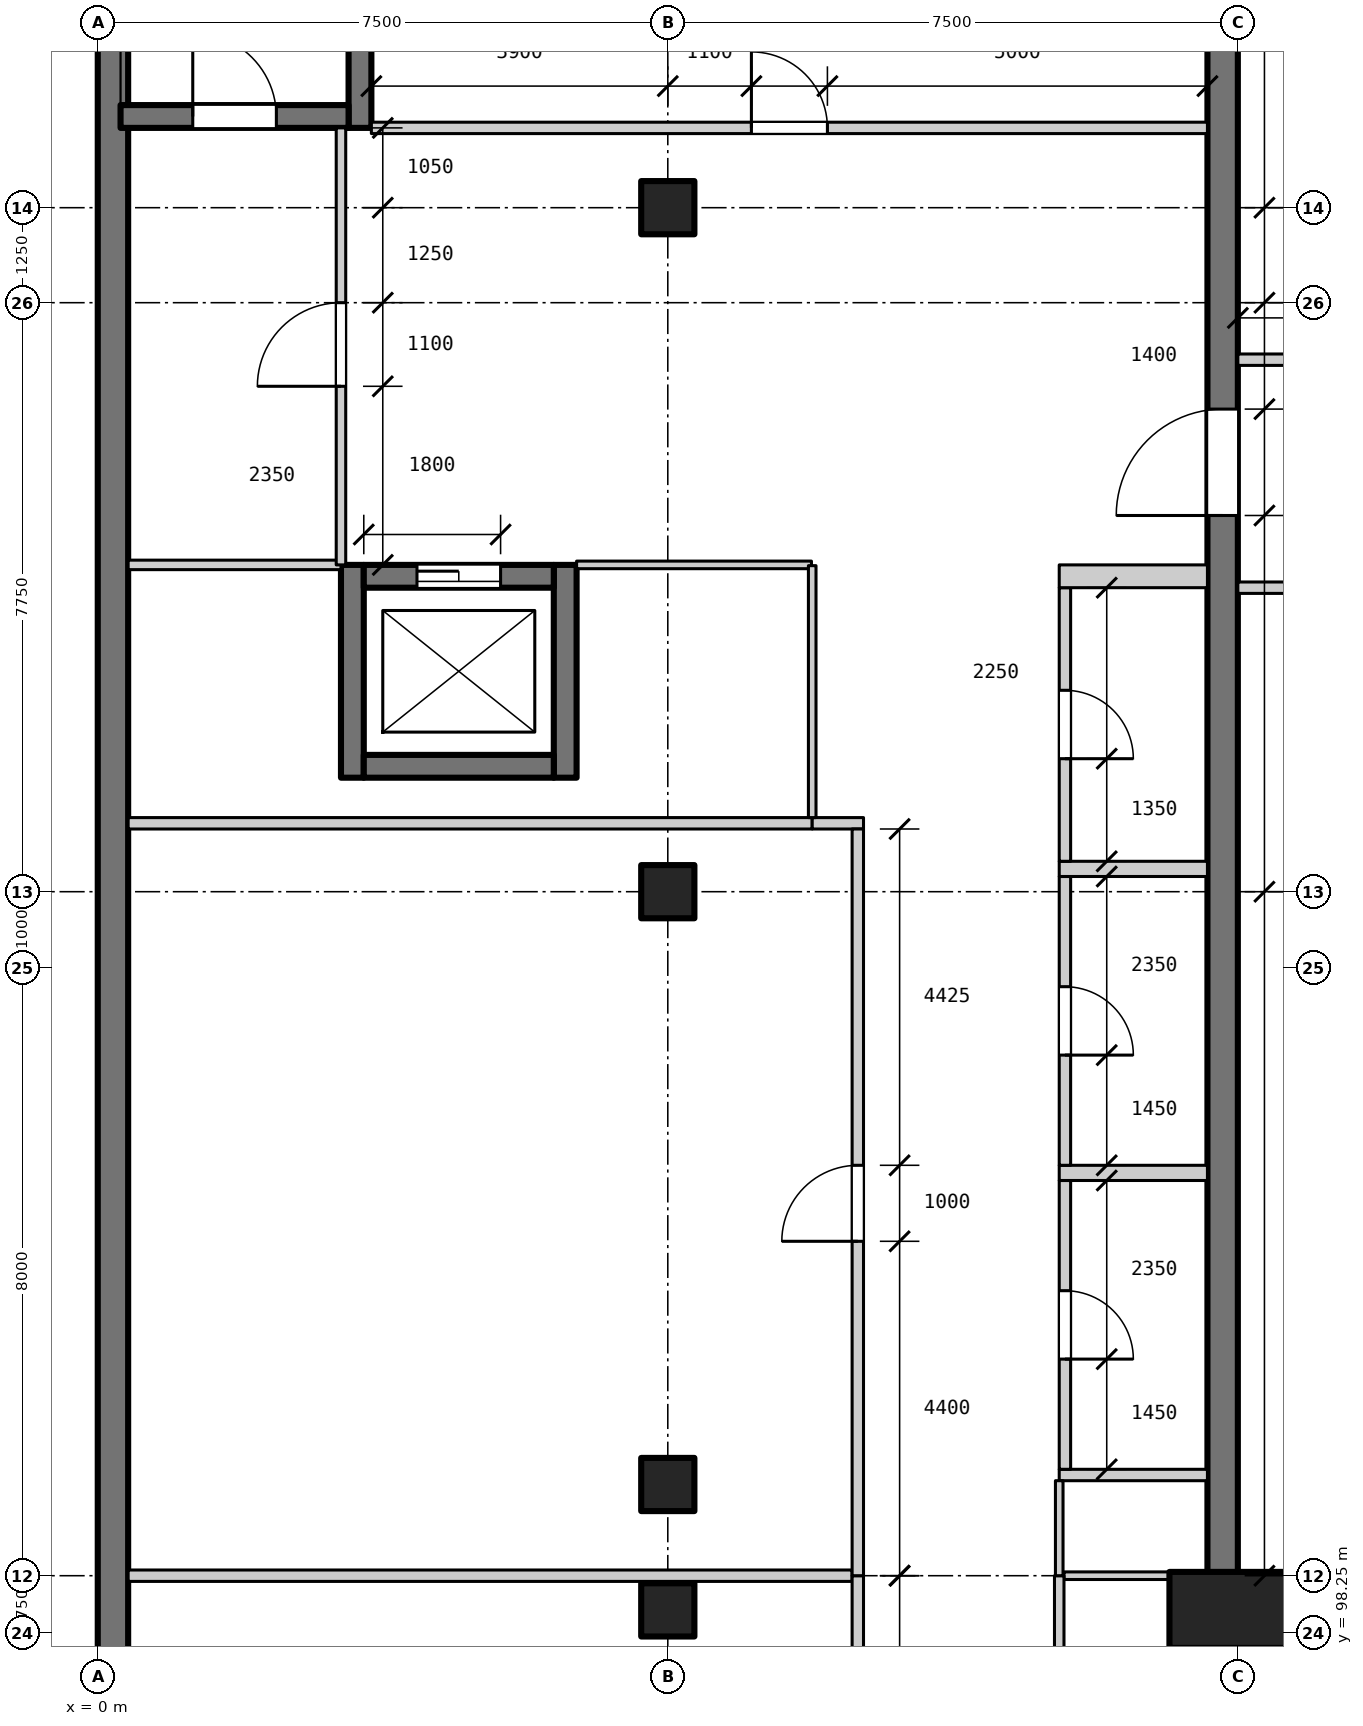
"""IFC4 building model, lengths in metres.
Left out: names, types, materials, properties, quantities, classifications, styles, units other than length and angle.
Written with IfcOpenShell. Run it as: python <this file> out.ifc"""

import sys

from ifc_helpers import new_model, si_unit, direction, frame, frame_2d, origin, origin_2d, place, context, subcontext, project, spatial, rectangle, extrude, element, fill, save


model = new_model("IFC4")
c1 = context("Model", 3, precision=1e-05, world=origin(), true_north=direction((0.0, 1.0)))
c2 = subcontext(c1, "Body", "Model", "MODEL_VIEW")
j1 = project(units=[si_unit("LENGTHUNIT", "METRE"), si_unit("PLANEANGLEUNIT", "RADIAN")], contexts=[c1])
p1 = place(None, origin())
s1 = spatial("IfcSite", under=j1, at=p1, CompositionType="ELEMENT")
p2 = place(p1, origin())
s2 = spatial("IfcBuilding", under=s1, at=p2, CompositionType="ELEMENT")
p3 = place(p2, frame((0.0, 0.0, -10.0)))
s3 = spatial("IfcBuildingStorey", under=s2, at=p3, CompositionType="ELEMENT", Elevation=-10.0)
for number, where, z_axis, x_axis in (
    (1, (7.5, 98.55, -1.4), (0.0, 0.0, 1.0), (1.0, 0.0, 0.0)),
    (2, (7.5, 100.2, -1.4), (0.0, 0.0, 1.0), (1.0, 0.0, 0.0)),
    (3, (7.5, 108.0, -1.4), (0.0, 0.0, 1.0), (1.0, 0.0, 0.0)),
    (4, (7.5, 117.0, -1.4), (0.0, 0.0, 1.0), (1.0, 0.0, 0.0)),
):
    element("IfcColumn", number, at=place(p3, frame(where, z_axis=z_axis, x_axis=x_axis)), inside=s3, PredefinedType="COLUMN", context=c2, shape_type="SweptSolid", body=[
        extrude(rectangle(XDim=0.7, YDim=0.7, at=origin_2d()), origin(), (0.0, 0.0, 1.0), 6.4),
    ])
p4 = place(p3, frame((0.2, 18.0, -1.4), z_axis=(0.0, 0.0, 1.0), x_axis=(0.0, 1.0, 0.0)))
e5 = element("IfcWall", 5, at=p4, inside=s3, PredefinedType="SOLIDWALL", context=c2, shape_type="SweptSolid", body=[
    extrude(rectangle(XDim=108.0, YDim=0.4, at=frame_2d((54.0, 0.0))), origin(), (0.0, 0.0, 1.0), 6.4),
])
p5 = place(p3, frame((14.8, 99.0, -1.4), z_axis=(0.0, 0.0, 1.0), x_axis=(0.0, 1.0, 0.0)))
e6 = element("IfcWall", 6, at=p5, inside=s3, PredefinedType="SHEAR", context=c2, shape_type="SweptSolid", body=[
    extrude(rectangle(XDim=26.6, YDim=0.4, at=frame_2d((13.3, 0.0))), origin(), (0.0, 0.0, 1.0), 6.4),
])
p6 = place(p5, frame((13.95, 0.0, 1.4)))
e7 = element("IfcOpeningElement", 7, at=p6, cuts=e6, PredefinedType="OPENING", context=c2, shape_type="SweptSolid", body=[
    extrude(rectangle(XDim=1.4, YDim=2.4, at=frame_2d((0.7, 1.2))), frame((0.0, 0.21, 0.0), z_axis=(0.0, -1.0, 0.0), x_axis=(1.0, 0.0, 0.0)), (0.0, 0.0, 1.0), 0.42),
])
p7 = place(p3, frame((3.45, 118.05, 0.0), z_axis=(0.0, 0.0, 1.0), x_axis=(0.0, 1.0, 0.0)))
e8 = element("IfcWall", 8, at=p7, inside=s3, PredefinedType="SHEAR", context=c2, shape_type="SweptSolid", body=[
    extrude(rectangle(XDim=7.5, YDim=0.3, at=frame_2d((3.75, 0.0))), origin(), (0.0, 0.0, 1.0), 5.0),
])
p8 = place(p3, frame((0.3, 118.2, 0.0), z_axis=(0.0, 0.0, 1.0), x_axis=(1.0, 0.0, 0.0)))
e9 = element("IfcWall", 9, at=p8, inside=s3, PredefinedType="SHEAR", context=c2, shape_type="SweptSolid", body=[
    extrude(rectangle(XDim=3.0, YDim=0.3, at=frame_2d((1.5, 0.0))), origin(), (0.0, 0.0, 1.0), 5.0),
])
p9 = place(p8, frame((0.95, 0.0, 0.0)))
e10 = element("IfcOpeningElement", 10, at=p9, cuts=e9, PredefinedType="OPENING", context=c2, shape_type="SweptSolid", body=[
    extrude(rectangle(XDim=1.1, YDim=2.1, at=frame_2d((0.55, 1.05))), frame((0.0, 0.16, 0.0), z_axis=(0.0, -1.0, 0.0), x_axis=(1.0, 0.0, 0.0)), (0.0, 0.0, 1.0), 0.32),
])
for number, where, z_axis, x_axis in (
    (11, (3.35, 109.5, -1.4), (0.0, 0.0, 1.0), (0.0, 1.0, 0.0)),
    (12, (6.15, 109.5, -1.4), (0.0, 0.0, 1.0), (0.0, 1.0, 0.0)),
):
    element("IfcWall", number, at=place(p3, frame(where, z_axis=z_axis, x_axis=x_axis)), inside=s3, PredefinedType="SHEAR", context=c2, shape_type="SweptSolid", body=[
        extrude(rectangle(XDim=2.8, YDim=0.3, at=frame_2d((1.4, 0.0))), origin(), (0.0, 0.0, 1.0), 6.4),
    ])
p10 = place(p3, frame((3.5, 109.65, -1.4), z_axis=(0.0, 0.0, 1.0), x_axis=(1.0, 0.0, 0.0)))
e13 = element("IfcWall", 13, at=p10, inside=s3, PredefinedType="SHEAR", context=c2, shape_type="SweptSolid", body=[
    extrude(rectangle(XDim=2.5, YDim=0.3, at=frame_2d((1.25, 0.0))), origin(), (0.0, 0.0, 1.0), 6.4),
])
p11 = place(p3, frame((3.5, 112.15, -1.4), z_axis=(0.0, 0.0, 1.0), x_axis=(1.0, 0.0, 0.0)))
e14 = element("IfcWall", 14, at=p11, inside=s3, PredefinedType="SHEAR", context=c2, shape_type="SweptSolid", body=[
    extrude(rectangle(XDim=2.5, YDim=0.3, at=frame_2d((1.25, 0.0))), origin(), (0.0, 0.0, 1.0), 6.4),
])
p12 = place(p11, frame((0.7, 0.0, 1.4)))
e15 = element("IfcOpeningElement", 15, at=p12, cuts=e14, PredefinedType="OPENING", context=c2, shape_type="SweptSolid", body=[
    extrude(rectangle(XDim=1.1, YDim=2.1, at=frame_2d((0.55, 1.05))), frame((0.0, 0.16, 0.0), z_axis=(0.0, -1.0, 0.0), x_axis=(1.0, 0.0, 0.0)), (0.0, 0.0, 1.0), 0.32),
])
p13 = place(p3, frame((15.0, 98.55, -1.4), z_axis=(0.0, 0.0, 1.0), x_axis=(1.0, 0.0, 0.0)))
e16 = element("IfcColumn", 16, at=p13, inside=s3, PredefinedType="COLUMN", context=c2, shape_type="SweptSolid", body=[
    extrude(rectangle(XDim=1.8, YDim=1.0, at=origin_2d()), origin(), (0.0, 0.0, 1.0), 6.4),
])
p14 = place(p3, frame((12.65, 100.325, 0.0), z_axis=(0.0, 0.0, 1.0), x_axis=(1.0, 0.0, 0.0)))
e17 = element("IfcWall", 17, at=p14, inside=s3, PredefinedType="PARTITIONING", context=c2, shape_type="SweptSolid", body=[
    extrude(rectangle(XDim=1.95, YDim=0.15, at=frame_2d((0.975, 0.0))), origin(), (0.0, 0.0, 1.0), 4.75),
])
p15 = place(p3, frame((12.725, 100.4, 0.0), z_axis=(0.0, 0.0, 1.0), x_axis=(0.0, 1.0, 0.0)))
e18 = element("IfcWall", 18, at=p15, inside=s3, PredefinedType="PARTITIONING", context=c2, shape_type="SweptSolid", body=[
    extrude(rectangle(XDim=3.8, YDim=0.15, at=frame_2d((1.9, 0.0))), origin(), (0.0, 0.0, 1.0), 4.75),
])
p16 = place(p15, frame((1.45, 0.0, 0.0)))
e19 = element("IfcOpeningElement", 19, at=p16, cuts=e18, PredefinedType="OPENING", context=c2, shape_type="SweptSolid", body=[
    extrude(rectangle(XDim=0.9, YDim=2.1, at=frame_2d((0.45, 1.05))), frame((0.0, 0.085, 0.0), z_axis=(0.0, -1.0, 0.0), x_axis=(1.0, 0.0, 0.0)), (0.0, 0.0, 1.0), 0.17),
])
p17 = place(p3, frame((12.65, 104.3, 0.0), z_axis=(0.0, 0.0, 1.0), x_axis=(1.0, 0.0, 0.0)))
e20 = element("IfcWall", 20, at=p17, inside=s3, PredefinedType="PARTITIONING", context=c2, shape_type="SweptSolid", body=[
    extrude(rectangle(XDim=1.95, YDim=0.2, at=frame_2d((0.975, 0.0))), origin(), (0.0, 0.0, 1.0), 4.75),
])
p18 = place(p3, frame((12.725, 104.4, 0.0), z_axis=(0.0, 0.0, 1.0), x_axis=(0.0, 1.0, 0.0)))
e21 = element("IfcWall", 21, at=p18, inside=s3, PredefinedType="PARTITIONING", context=c2, shape_type="SweptSolid", body=[
    extrude(rectangle(XDim=3.8, YDim=0.15, at=frame_2d((1.9, 0.0))), origin(), (0.0, 0.0, 1.0), 4.75),
])
p19 = place(p18, frame((1.45, 0.0, 0.0)))
e22 = element("IfcOpeningElement", 22, at=p19, cuts=e21, PredefinedType="OPENING", context=c2, shape_type="SweptSolid", body=[
    extrude(rectangle(XDim=0.9, YDim=2.1, at=frame_2d((0.45, 1.05))), frame((0.0, 0.085, 0.0), z_axis=(0.0, -1.0, 0.0), x_axis=(1.0, 0.0, 0.0)), (0.0, 0.0, 1.0), 0.17),
])
p20 = place(p3, frame((12.65, 108.3, 0.0), z_axis=(0.0, 0.0, 1.0), x_axis=(1.0, 0.0, 0.0)))
e23 = element("IfcWall", 23, at=p20, inside=s3, PredefinedType="PARTITIONING", context=c2, shape_type="SweptSolid", body=[
    extrude(rectangle(XDim=1.95, YDim=0.2, at=frame_2d((0.975, 0.0))), origin(), (0.0, 0.0, 1.0), 4.75),
])
p21 = place(p3, frame((12.725, 108.4, 0.0), z_axis=(0.0, 0.0, 1.0), x_axis=(0.0, 1.0, 0.0)))
e24 = element("IfcWall", 24, at=p21, inside=s3, PredefinedType="PARTITIONING", context=c2, shape_type="SweptSolid", body=[
    extrude(rectangle(XDim=3.6, YDim=0.15, at=frame_2d((1.8, 0.0))), origin(), (0.0, 0.0, 1.0), 4.75),
])
p22 = place(p21, frame((1.35, 0.0, 0.0)))
e25 = element("IfcOpeningElement", 25, at=p22, cuts=e24, PredefinedType="OPENING", context=c2, shape_type="SweptSolid", body=[
    extrude(rectangle(XDim=0.9, YDim=2.1, at=frame_2d((0.45, 1.05))), frame((0.0, 0.085, 0.0), z_axis=(0.0, -1.0, 0.0), x_axis=(1.0, 0.0, 0.0)), (0.0, 0.0, 1.0), 0.17),
])
p23 = place(p3, frame((12.65, 112.15, 0.0), z_axis=(0.0, 0.0, 1.0), x_axis=(1.0, 0.0, 0.0)))
e26 = element("IfcWall", 26, at=p23, inside=s3, PredefinedType="PARTITIONING", context=c2, shape_type="SweptSolid", body=[
    extrude(rectangle(XDim=1.95, YDim=0.3, at=frame_2d((0.975, 0.0))), origin(), (0.0, 0.0, 1.0), 4.75),
])
p24 = place(p3, frame((0.4, 99.0, 0.0), z_axis=(0.0, 0.0, 1.0), x_axis=(1.0, 0.0, 0.0)))
e27 = element("IfcWall", 27, at=p24, inside=s3, PredefinedType="PARTITIONING", context=c2, shape_type="SweptSolid", body=[
    extrude(rectangle(XDim=9.525, YDim=0.15, at=frame_2d((4.763, 0.0))), origin(), (0.0, 0.0, 1.0), 4.75),
])
p25 = place(p3, frame((12.712, 99.0, 0.0), z_axis=(0.0, 0.0, 1.0), x_axis=(1.0, 0.0, 0.0)))
e28 = element("IfcWall", 28, at=p25, inside=s3, PredefinedType="PARTITIONING", context=c2, shape_type="SweptSolid", body=[
    extrude(rectangle(XDim=1.388, YDim=0.1, at=frame_2d((0.694, 0.0))), origin(), (0.0, 0.0, 1.0), 4.75),
])
p26 = place(p3, frame((0.4, 108.9, 0.0), z_axis=(0.0, 0.0, 1.0), x_axis=(1.0, 0.0, 0.0)))
e29 = element("IfcWall", 29, at=p26, inside=s3, PredefinedType="PARTITIONING", context=c2, shape_type="SweptSolid", body=[
    extrude(rectangle(XDim=9.0, YDim=0.15, at=frame_2d((4.5, 0.0))), origin(), (0.0, 0.0, 1.0), 4.75),
])
p27 = place(p3, frame((9.4, 108.9, 0.0), z_axis=(0.0, 0.0, 1.0), x_axis=(1.0, 0.0, 0.0)))
e30 = element("IfcWall", 30, at=p27, inside=s3, PredefinedType="PARTITIONING", context=c2, shape_type="SweptSolid", body=[
    extrude(rectangle(XDim=0.675, YDim=0.15, at=frame_2d((0.337, 0.0))), origin(), (0.0, 0.0, 1.0), 4.75),
])
p28 = place(p3, frame((15.0, 112.0, 0.0), z_axis=(0.0, 0.0, 1.0), x_axis=(1.0, 0.0, 0.0)))
e31 = element("IfcWall", 31, at=p28, inside=s3, PredefinedType="PARTITIONING", context=c2, shape_type="SweptSolid", body=[
    extrude(rectangle(XDim=14.99, YDim=0.15, at=frame_2d((7.495, 0.0))), origin(), (0.0, 0.0, 1.0), 4.75),
])
p29 = place(p3, frame((0.4, 112.3, 0.0), z_axis=(0.0, 0.0, 1.0), x_axis=(1.0, 0.0, 0.0)))
e32 = element("IfcWall", 32, at=p29, inside=s3, PredefinedType="PARTITIONING", context=c2, shape_type="SweptSolid", body=[
    extrude(rectangle(XDim=2.8, YDim=0.125, at=frame_2d((1.4, 0.0))), origin(), (0.0, 0.0, 1.0), 4.75),
])
p30 = place(p3, frame((6.3, 112.3, 0.0), z_axis=(0.0, 0.0, 1.0), x_axis=(1.0, 0.0, 0.0)))
e33 = element("IfcWall", 33, at=p30, inside=s3, PredefinedType="PARTITIONING", context=c2, shape_type="SweptSolid", body=[
    extrude(rectangle(XDim=3.09, YDim=0.1, at=frame_2d((1.545, 0.0))), origin(), (0.0, 0.0, 1.0), 4.75),
])
p31 = place(p3, frame((15.0, 115.0, 0.0), z_axis=(0.0, 0.0, 1.0), x_axis=(1.0, 0.0, 0.0)))
e34 = element("IfcWall", 34, at=p31, inside=s3, PredefinedType="PARTITIONING", context=c2, shape_type="SweptSolid", body=[
    extrude(rectangle(XDim=14.0, YDim=0.15, at=frame_2d((7.0, 0.0))), origin(), (0.0, 0.0, 1.0), 4.75),
])
p32 = place(p31, frame((6.0, 0.0, 0.0)))
e35 = element("IfcOpeningElement", 35, at=p32, cuts=e34, PredefinedType="OPENING", context=c2, shape_type="SweptSolid", body=[
    extrude(rectangle(XDim=2.0, YDim=2.4, at=frame_2d((1.0, 1.2))), frame((0.0, 0.085, 0.0), z_axis=(0.0, -1.0, 0.0), x_axis=(1.0, 0.0, 0.0)), (0.0, 0.0, 1.0), 0.17),
])
p33 = place(p3, frame((3.6, 118.05, 0.0), z_axis=(0.0, 0.0, 1.0), x_axis=(1.0, 0.0, 0.0)))
e36 = element("IfcWall", 36, at=p33, inside=s3, PredefinedType="PARTITIONING", context=c2, shape_type="SweptSolid", body=[
    extrude(rectangle(XDim=11.0, YDim=0.15, at=frame_2d((5.5, 0.0))), origin(), (0.0, 0.0, 1.0), 4.75),
])
p34 = place(p33, frame((5.0, 0.0, 0.0)))
e37 = element("IfcOpeningElement", 37, at=p34, cuts=e36, PredefinedType="OPENING", context=c2, shape_type="SweptSolid", body=[
    extrude(rectangle(XDim=1.0, YDim=2.1, at=frame_2d((0.5, 1.05))), frame((0.0, 0.085, 0.0), z_axis=(0.0, -1.0, 0.0), x_axis=(1.0, 0.0, 0.0)), (0.0, 0.0, 1.0), 0.17),
])
p35 = place(p3, frame((3.2, 112.3, 0.0), z_axis=(0.0, 0.0, 1.0), x_axis=(0.0, 1.0, 0.0)))
e38 = element("IfcWall", 38, at=p35, inside=s3, PredefinedType="PARTITIONING", context=c2, shape_type="SweptSolid", body=[
    extrude(rectangle(XDim=5.75, YDim=0.125, at=frame_2d((2.875, 0.0))), origin(), (0.0, 0.0, 1.0), 4.75),
])
p36 = place(p35, frame((2.35, 0.0, 0.0)))
e39 = element("IfcOpeningElement", 39, at=p36, cuts=e38, PredefinedType="OPENING", context=c2, shape_type="SweptSolid", body=[
    extrude(rectangle(XDim=1.1, YDim=2.1, at=frame_2d((0.55, 1.05))), frame((0.0, 0.073, 0.0), z_axis=(0.0, -1.0, 0.0), x_axis=(1.0, 0.0, 0.0)), (0.0, 0.0, 1.0), 0.145),
])
p37 = place(p3, frame((9.4, 108.975, 0.0), z_axis=(0.0, 0.0, 1.0), x_axis=(0.0, 1.0, 0.0)))
e40 = element("IfcWall", 40, at=p37, inside=s3, PredefinedType="PARTITIONING", context=c2, shape_type="SweptSolid", body=[
    extrude(rectangle(XDim=3.315, YDim=0.1, at=frame_2d((1.657, 0.0))), origin(), (0.0, 0.0, 1.0), 4.75),
])
p38 = place(p3, frame((10.0, 87.75, 0.0), z_axis=(0.0, 0.0, 1.0), x_axis=(0.0, 1.0, 0.0)))
e41 = element("IfcWall", 41, at=p38, inside=s3, PredefinedType="PARTITIONING", context=c2, shape_type="SweptSolid", body=[
    extrude(rectangle(XDim=11.25, YDim=0.15, at=frame_2d((5.625, 0.0))), origin(), (0.0, 0.0, 1.0), 4.75),
])
p39 = place(p38, frame((5.05, 0.0, 0.0)))
e42 = element("IfcOpeningElement", 42, at=p39, cuts=e41, PredefinedType="OPENING", context=c2, shape_type="SweptSolid", body=[
    extrude(rectangle(XDim=1.2, YDim=2.4, at=frame_2d((0.6, 1.2))), frame((0.0, 0.085, 0.0), z_axis=(0.0, -1.0, 0.0), x_axis=(1.0, 0.0, 0.0)), (0.0, 0.0, 1.0), 0.17),
])
p40 = place(p3, frame((10.0, 99.0, 0.0), z_axis=(0.0, 0.0, 1.0), x_axis=(0.0, 1.0, 0.0)))
e43 = element("IfcWall", 43, at=p40, inside=s3, PredefinedType="PARTITIONING", context=c2, shape_type="SweptSolid", body=[
    extrude(rectangle(XDim=9.825, YDim=0.15, at=frame_2d((4.913, 0.0))), origin(), (0.0, 0.0, 1.0), 4.75),
])
p41 = place(p40, frame((4.4, 0.0, 0.0)))
e44 = element("IfcOpeningElement", 44, at=p41, cuts=e43, PredefinedType="OPENING", context=c2, shape_type="SweptSolid", body=[
    extrude(rectangle(XDim=1.0, YDim=2.1, at=frame_2d((0.5, 1.05))), frame((0.0, 0.085, 0.0), z_axis=(0.0, -1.0, 0.0), x_axis=(1.0, 0.0, 0.0)), (0.0, 0.0, 1.0), 0.17),
])
p42 = place(p3, frame((12.65, 85.5, 0.0), z_axis=(0.0, 0.0, 1.0), x_axis=(0.0, 1.0, 0.0)))
e45 = element("IfcWall", 45, at=p42, inside=s3, PredefinedType="PARTITIONING", context=c2, shape_type="SweptSolid", body=[
    extrude(rectangle(XDim=13.5, YDim=0.125, at=frame_2d((6.75, 0.0))), origin(), (0.0, 0.0, 1.0), 4.75),
])
p43 = place(p3, frame((12.65, 99.0, 0.0), z_axis=(0.0, 0.0, 1.0), x_axis=(0.0, 1.0, 0.0)))
e46 = element("IfcWall", 46, at=p43, inside=s3, PredefinedType="PARTITIONING", context=c2, shape_type="SweptSolid", body=[
    extrude(rectangle(XDim=1.25, YDim=0.1, at=frame_2d((0.625, 0.0))), origin(), (0.0, 0.0, 1.0), 4.75),
])
p44 = place(p16, frame((0.9, 0.0, 0.0), z_axis=(0.0, 0.0, 1.0), x_axis=(-1.0, 0.0, 0.0)))
e47 = element("IfcDoor", 47, at=p44, inside=s3, OperationType="SINGLE_SWING_RIGHT", PredefinedType="DOOR", context=c2, shape_type="SweptSolid", body=[
    extrude(rectangle(XDim=0.9, YDim=2.1, at=frame_2d((0.45, 1.05))), frame((0.0, 0.025, 0.0), z_axis=(0.0, -1.0, 0.0), x_axis=(1.0, 0.0, 0.0)), (0.0, 0.0, 1.0), 0.05),
])
fill(e19, e47)
p45 = place(p41, origin())
e48 = element("IfcDoor", 48, at=p45, inside=s3, OperationType="SINGLE_SWING_LEFT", PredefinedType="DOOR", context=c2, shape_type="SweptSolid", body=[
    extrude(rectangle(XDim=1.0, YDim=2.1, at=frame_2d((0.5, 1.05))), frame((0.0, 0.025, 0.0), z_axis=(0.0, -1.0, 0.0), x_axis=(1.0, 0.0, 0.0)), (0.0, 0.0, 1.0), 0.05),
])
fill(e44, e48)
p46 = place(p19, frame((0.9, 0.0, 0.0), z_axis=(0.0, 0.0, 1.0), x_axis=(-1.0, 0.0, 0.0)))
e49 = element("IfcDoor", 49, at=p46, inside=s3, OperationType="SINGLE_SWING_RIGHT", PredefinedType="DOOR", context=c2, shape_type="SweptSolid", body=[
    extrude(rectangle(XDim=0.9, YDim=2.1, at=frame_2d((0.45, 1.05))), frame((0.0, 0.025, 0.0), z_axis=(0.0, -1.0, 0.0), x_axis=(1.0, 0.0, 0.0)), (0.0, 0.0, 1.0), 0.05),
])
fill(e22, e49)
p47 = place(p22, frame((0.9, 0.0, 0.0), z_axis=(0.0, 0.0, 1.0), x_axis=(-1.0, 0.0, 0.0)))
e50 = element("IfcDoor", 50, at=p47, inside=s3, OperationType="SINGLE_SWING_RIGHT", PredefinedType="DOOR", context=c2, shape_type="SweptSolid", body=[
    extrude(rectangle(XDim=0.9, YDim=2.1, at=frame_2d((0.45, 1.05))), frame((0.0, 0.025, 0.0), z_axis=(0.0, -1.0, 0.0), x_axis=(1.0, 0.0, 0.0)), (0.0, 0.0, 1.0), 0.05),
])
fill(e25, e50)
p48 = place(p6, origin())
e51 = element("IfcDoor", 51, at=p48, inside=s3, OperationType="SINGLE_SWING_LEFT", PredefinedType="DOOR", context=c2, shape_type="SweptSolid", body=[
    extrude(rectangle(XDim=1.4, YDim=2.4, at=frame_2d((0.7, 1.2))), frame((0.0, 0.025, 0.0), z_axis=(0.0, -1.0, 0.0), x_axis=(1.0, 0.0, 0.0)), (0.0, 0.0, 1.0), 0.05),
])
fill(e7, e51)
p49 = place(p36, origin())
e52 = element("IfcDoor", 52, at=p49, inside=s3, OperationType="SINGLE_SWING_LEFT", PredefinedType="DOOR", context=c2, shape_type="SweptSolid", body=[
    extrude(rectangle(XDim=1.1, YDim=2.1, at=frame_2d((0.55, 1.05))), frame((0.0, 0.025, 0.0), z_axis=(0.0, -1.0, 0.0), x_axis=(1.0, 0.0, 0.0)), (0.0, 0.0, 1.0), 0.05),
])
fill(e39, e52)
p50 = place(p34, origin())
e53 = element("IfcDoor", 53, at=p50, inside=s3, OperationType="SINGLE_SWING_LEFT", PredefinedType="DOOR", context=c2, shape_type="SweptSolid", body=[
    extrude(rectangle(XDim=1.0, YDim=2.1, at=frame_2d((0.5, 1.05))), frame((0.0, 0.025, 0.0), z_axis=(0.0, -1.0, 0.0), x_axis=(1.0, 0.0, 0.0)), (0.0, 0.0, 1.0), 0.05),
])
fill(e37, e53)
p51 = place(p9, origin())
e54 = element("IfcDoor", 54, at=p51, inside=s3, OperationType="SINGLE_SWING_LEFT", PredefinedType="DOOR", context=c2, shape_type="SweptSolid", body=[
    extrude(rectangle(XDim=1.1, YDim=2.1, at=frame_2d((0.55, 1.05))), frame((0.0, 0.025, 0.0), z_axis=(0.0, -1.0, 0.0), x_axis=(1.0, 0.0, 0.0)), (0.0, 0.0, 1.0), 0.05),
])
fill(e10, e54)
p52 = place(p12, origin())
e55 = element("IfcDoor", 55, at=p52, inside=s3, OperationType="SLIDING_TO_LEFT", PredefinedType="DOOR", context=c2, shape_type="SweptSolid", body=[
    extrude(rectangle(XDim=1.1, YDim=2.1, at=frame_2d((0.55, 1.05))), frame((0.0, 0.025, 0.0), z_axis=(0.0, -1.0, 0.0), x_axis=(1.0, 0.0, 0.0)), (0.0, 0.0, 1.0), 0.05),
])
fill(e15, e55)
save(model, sys.argv[1])
